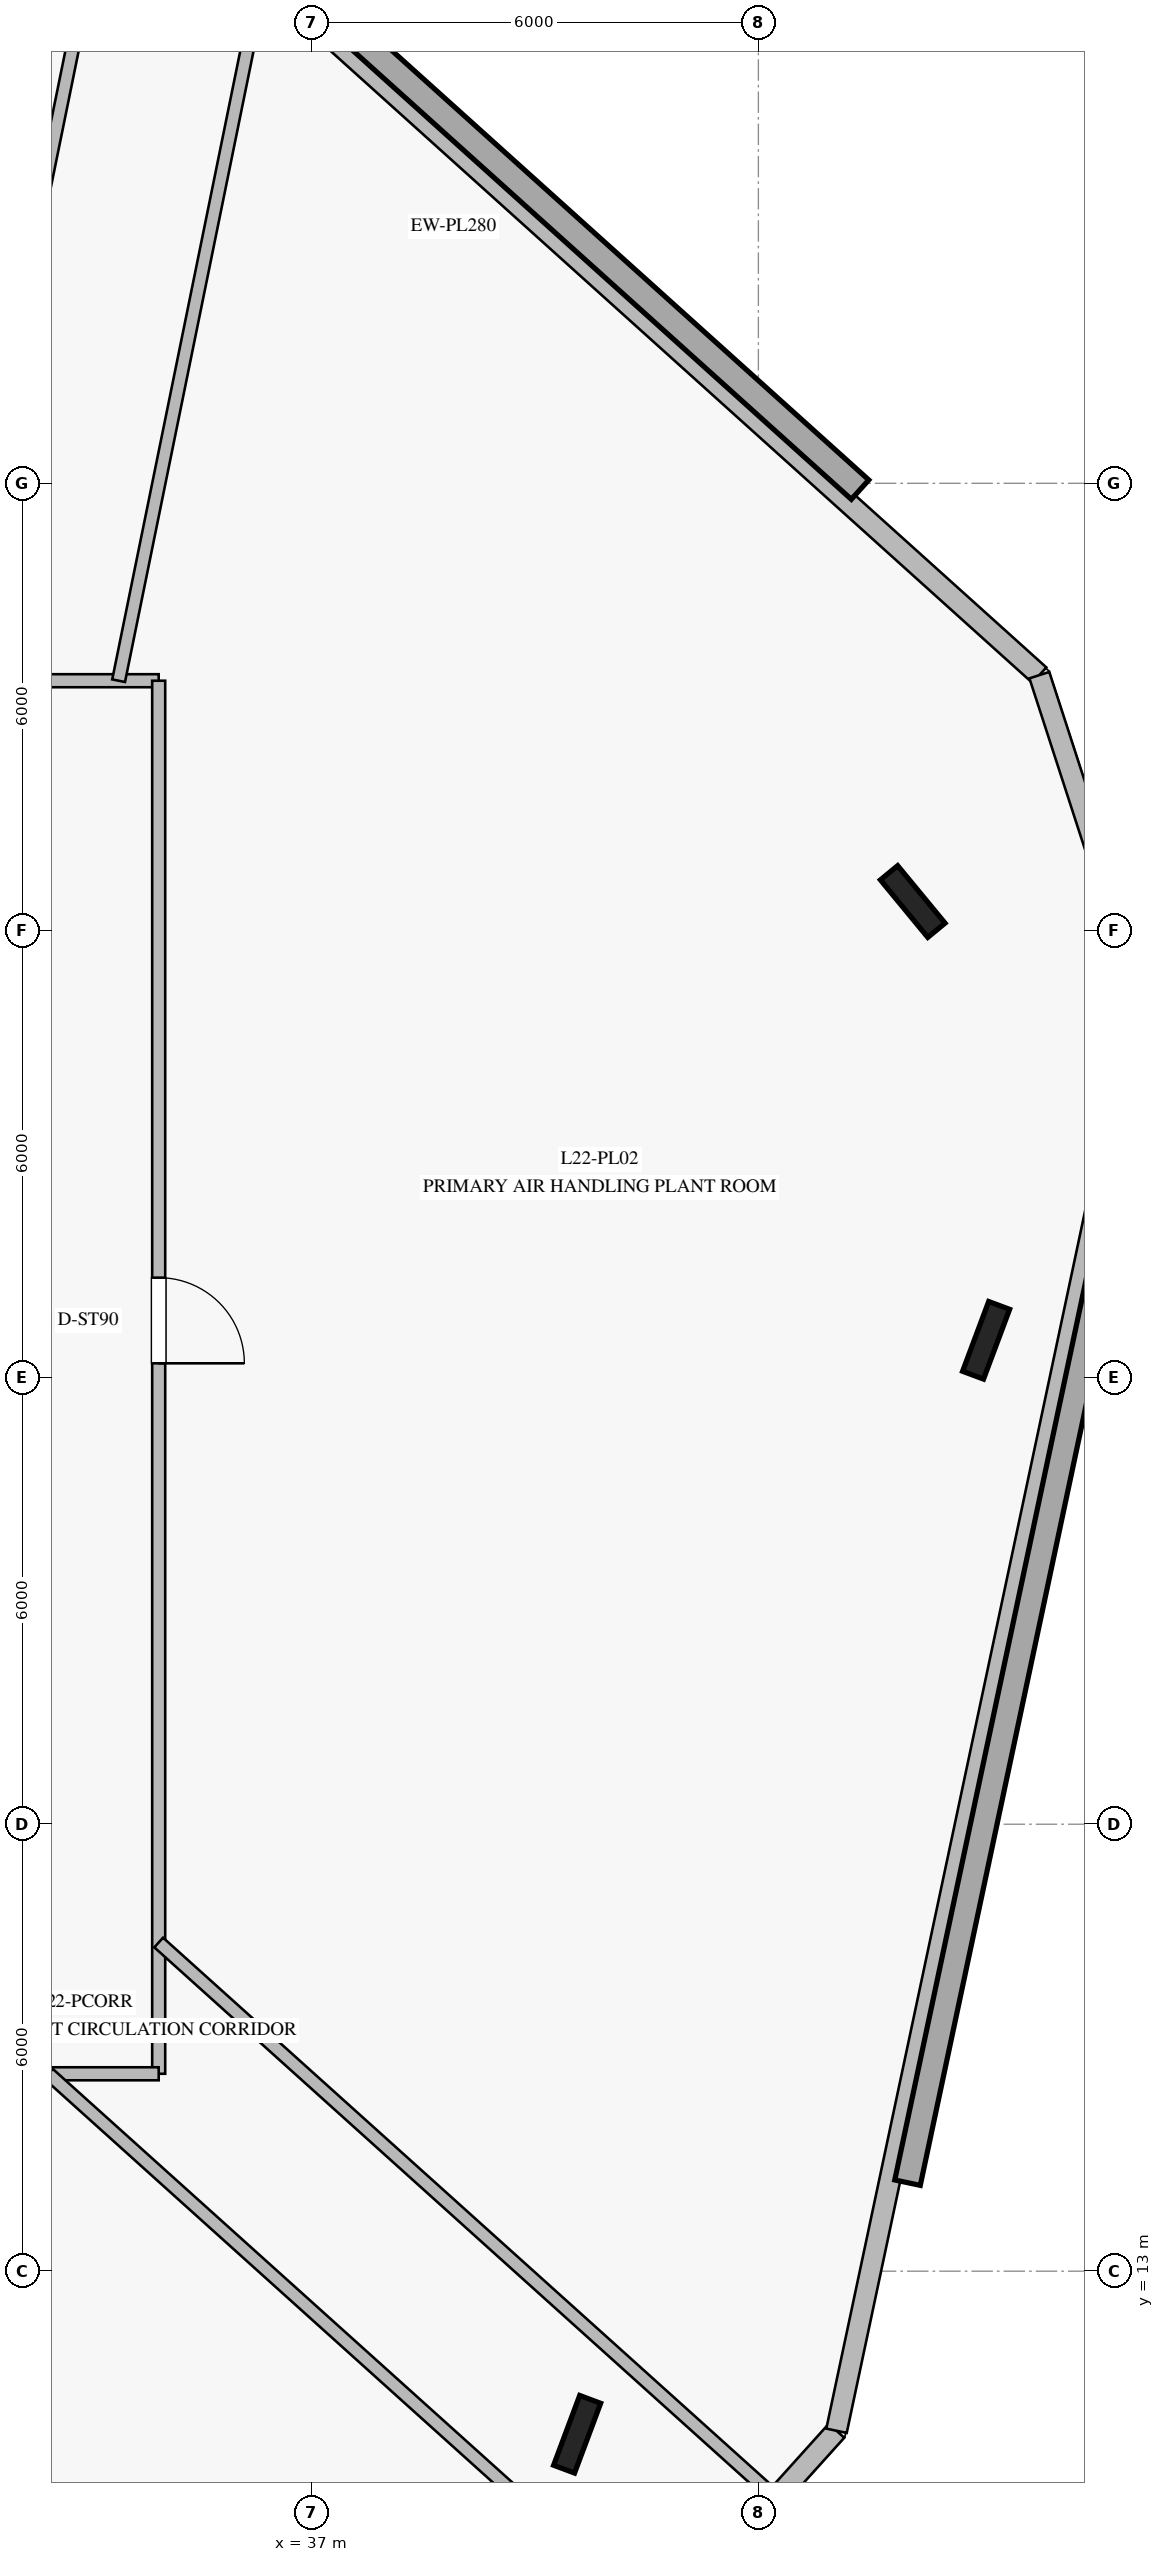
"""IFC4 building model, lengths in metres.
Left out: names, types, materials, properties, quantities, classifications, styles, units other than length and angle.
Written with IfcOpenShell. Run it as: python <this file> out.ifc"""

import sys

from ifc_helpers import new_model, si_unit, direction, frame, frame_2d, origin, origin_2d, place, context, subcontext, project, spatial, rectangle, i_section, extrude, element, fill, save


model = new_model("IFC4")
c1 = context("Model", 3, precision=1e-05, world=origin(), true_north=direction((0.0, 1.0)))
c2 = subcontext(c1, "Body", "Model", "MODEL_VIEW")
j1 = project(units=[si_unit("LENGTHUNIT", "METRE"), si_unit("PLANEANGLEUNIT", "RADIAN")], contexts=[c1])
p1 = place(None, origin())
s1 = spatial("IfcSite", under=j1, at=p1, CompositionType="ELEMENT")
p2 = place(p1, origin())
s2 = spatial("IfcBuilding", under=s1, at=p2, CompositionType="ELEMENT")
p3 = place(p2, frame((0.0, 0.0, 92.0)))
s3 = spatial("IfcBuildingStorey", under=s2, at=p3, CompositionType="ELEMENT", Elevation=92.0)
for number, where, z_axis, x_axis in (
    (1, (45.072, 31.386, 0.0), (0.0, 0.0, 1.0), (-0.636, 0.772, 0.0)),
    (2, (40.567, 10.811, 0.0), (0.0, 0.0, 1.0), (0.35, 0.937, 0.0)),
    (3, (46.057, 25.496, 0.0), (0.0, 0.0, 1.0), (0.35, 0.937, 0.0)),
):
    element("IfcColumn", number, at=place(p3, frame(where, z_axis=z_axis, x_axis=x_axis)), inside=s3, PredefinedType="COLUMN", context=c2, shape_type="SweptSolid", body=[
        extrude(i_section(OverallWidth=0.3, OverallDepth=1.0, WebThickness=0.019, FlangeThickness=0.036, at=origin_2d()), origin(), (0.0, 0.0, 1.0), 5.4),
    ])
p4 = place(p3, frame((46.772, 34.425, 0.0), z_axis=(0.0, 0.0, 1.0), x_axis=(-0.743161948842, 0.669111588446, 0.0)))
e4 = element("IfcWall", 4, at=p4, inside=s3, PredefinedType="STANDARD", context=c2, shape_type="SweptSolid", body=[
    extrude(rectangle(XDim=19.745, YDim=0.28, at=frame_2d((9.873, 0.0))), origin(), (0.0, 0.0, 1.0), 5.14),
])
p5 = place(p3, frame((41.055, 7.534, 0.0), z_axis=(0.0, 0.0, 1.0), x_axis=(0.669281253692, 0.743009154356, 0.0)))
e5 = element("IfcWall", 5, at=p5, inside=s3, PredefinedType="STANDARD", context=c2, shape_type="SweptSolid", body=[
    extrude(rectangle(XDim=4.474, YDim=0.28, at=frame_2d((2.237, 0.0))), origin(), (0.0, 0.0, 1.0), 5.14),
])
p6 = place(p3, frame((44.049, 10.858, 0.0), z_axis=(0.0, 0.0, 1.0), x_axis=(0.207858460047, 0.97815891377, 0.0)))
e6 = element("IfcWall", 6, at=p6, inside=s3, PredefinedType="STANDARD", context=c2, shape_type="SweptSolid", body=[
    extrude(rectangle(XDim=19.744, YDim=0.28, at=frame_2d((9.872, 0.0))), origin(), (0.0, 0.0, 1.0), 5.14),
])
p7 = place(p3, frame((48.153, 30.171, 0.0), z_axis=(0.0, 0.0, 1.0), x_axis=(-0.308783667438, 0.951132297172, 0.0)))
e7 = element("IfcWall", 7, at=p7, inside=s3, PredefinedType="STANDARD", context=c2, shape_type="SweptSolid", body=[
    extrude(rectangle(XDim=4.473, YDim=0.28, at=frame_2d((2.236, 0.0))), origin(), (0.0, 0.0, 1.0), 5.14),
])
p8 = place(p3, frame((15.05, 34.35, 0.0), z_axis=(0.0, 0.0, 1.0), x_axis=(1.0, 0.0, 0.0)))
e8 = element("IfcWall", 8, at=p8, inside=s3, PredefinedType="PARTITIONING", context=c2, shape_type="SweptSolid", body=[
    extrude(rectangle(XDim=19.9, YDim=0.175, at=frame_2d((9.95, 0.0))), origin(), (0.0, 0.0, 1.0), 3.54),
])
p9 = place(p8, frame((12.826, 0.0, 0.0)))
e9 = element("IfcOpeningElement", 9, at=p9, cuts=e8, PredefinedType="OPENING", context=c2, shape_type="SweptSolid", body=[
    extrude(rectangle(XDim=1.15, YDim=2.2, at=frame_2d((0.575, 1.1))), frame((0.0, 0.098, 0.0), z_axis=(0.0, -1.0, 0.0), x_axis=(1.0, 0.0, 0.0)), (0.0, 0.0, 1.0), 0.195),
])
p10 = place(p8, frame((5.085, 0.0, 0.0)))
e10 = element("IfcOpeningElement", 10, at=p10, cuts=e8, PredefinedType="OPENING", context=c2, shape_type="SweptSolid", body=[
    extrude(rectangle(XDim=1.15, YDim=2.2, at=frame_2d((0.575, 1.1))), frame((0.0, 0.098, 0.0), z_axis=(0.0, -1.0, 0.0), x_axis=(1.0, 0.0, 0.0)), (0.0, 0.0, 1.0), 0.195),
])
p11 = place(p3, frame((34.95, 34.35, 0.0), z_axis=(0.0, 0.0, 1.0), x_axis=(0.0, -1.0, 0.0)))
e11 = element("IfcWall", 11, at=p11, inside=s3, PredefinedType="PARTITIONING", context=c2, shape_type="SweptSolid", body=[
    extrude(rectangle(XDim=18.7, YDim=0.175, at=frame_2d((9.35, 0.0))), origin(), (0.0, 0.0, 1.0), 3.54),
])
p12 = place(p11, frame((8.013, 0.0, 0.0)))
e12 = element("IfcOpeningElement", 12, at=p12, cuts=e11, PredefinedType="OPENING", context=c2, shape_type="SweptSolid", body=[
    extrude(rectangle(XDim=1.15, YDim=2.2, at=frame_2d((0.575, 1.1))), frame((0.0, 0.098, 0.0), z_axis=(0.0, -1.0, 0.0), x_axis=(1.0, 0.0, 0.0)), (0.0, 0.0, 1.0), 0.195),
])
p13 = place(p3, frame((34.95, 15.65, 0.0), z_axis=(0.0, 0.0, 1.0), x_axis=(-1.0, 0.0, 0.0)))
e13 = element("IfcWall", 13, at=p13, inside=s3, PredefinedType="PARTITIONING", context=c2, shape_type="SweptSolid", body=[
    extrude(rectangle(XDim=19.9, YDim=0.175, at=frame_2d((9.95, 0.0))), origin(), (0.0, 0.0, 1.0), 3.54),
])
p14 = place(p13, frame((8.511, 0.0, 0.0)))
e14 = element("IfcOpeningElement", 14, at=p14, cuts=e13, PredefinedType="OPENING", context=c2, shape_type="SweptSolid", body=[
    extrude(rectangle(XDim=1.2, YDim=2.25, at=frame_2d((0.6, 1.125))), frame((0.0, 0.098, 0.0), z_axis=(0.0, -1.0, 0.0), x_axis=(1.0, 0.0, 0.0)), (0.0, 0.0, 1.0), 0.195),
])
p15 = place(p3, frame((33.47, 15.65, 0.0), z_axis=(0.0, 0.0, 1.0), x_axis=(0.743388992032, -0.66885933239, 0.0)))
e15 = element("IfcWall", 15, at=p15, inside=s3, PredefinedType="PARTITIONING", context=c2, shape_type="SweptSolid", body=[
    extrude(rectangle(XDim=11.007, YDim=0.175, at=frame_2d((5.503, 0.0))), origin(), (0.0, 0.0, 1.0), 3.53),
])
p16 = place(p3, frame((34.95, 17.412, 0.0), z_axis=(0.0, 0.0, 1.0), x_axis=(0.743376269503, -0.668873472295, 0.0)))
e16 = element("IfcWall", 16, at=p16, inside=s3, PredefinedType="PARTITIONING", context=c2, shape_type="SweptSolid", body=[
    extrude(rectangle(XDim=11.086, YDim=0.175, at=frame_2d((5.543, 0.0))), origin(), (0.0, 0.0, 1.0), 3.53),
])
p17 = place(p3, frame((34.412, 34.35, 0.0), z_axis=(0.0, 0.0, 1.0), x_axis=(0.199614906569, 0.979874425156, 0.0)))
e17 = element("IfcWall", 17, at=p17, inside=s3, PredefinedType="PARTITIONING", context=c2, shape_type="SweptSolid", body=[
    extrude(rectangle(XDim=9.578, YDim=0.175, at=frame_2d((4.789, 0.0))), origin(), (0.0, 0.0, 1.0), 3.53),
])
p18 = place(p3, frame((32.064, 34.35, 0.0), z_axis=(0.0, 0.0, 1.0), x_axis=(0.199652459502, 0.979866774319, 0.0)))
e18 = element("IfcWall", 18, at=p18, inside=s3, PredefinedType="PARTITIONING", context=c2, shape_type="SweptSolid", body=[
    extrude(rectangle(XDim=11.4, YDim=0.175, at=frame_2d((5.7, 0.0))), origin(), (0.0, 0.0, 1.0), 3.53),
])
p19 = place(p12, origin())
e19 = element("IfcDoor", 19, at=p19, inside=s3, OperationType="SINGLE_SWING_RIGHT", PredefinedType="DOOR", context=c2, shape_type="SweptSolid", body=[
    extrude(rectangle(XDim=1.15, YDim=2.2, at=frame_2d((0.575, 1.1))), frame((0.0, 0.025, 0.0), z_axis=(0.0, -1.0, 0.0), x_axis=(1.0, 0.0, 0.0)), (0.0, 0.0, 1.0), 0.05),
])
fill(e12, e19)
save(model, sys.argv[1])
